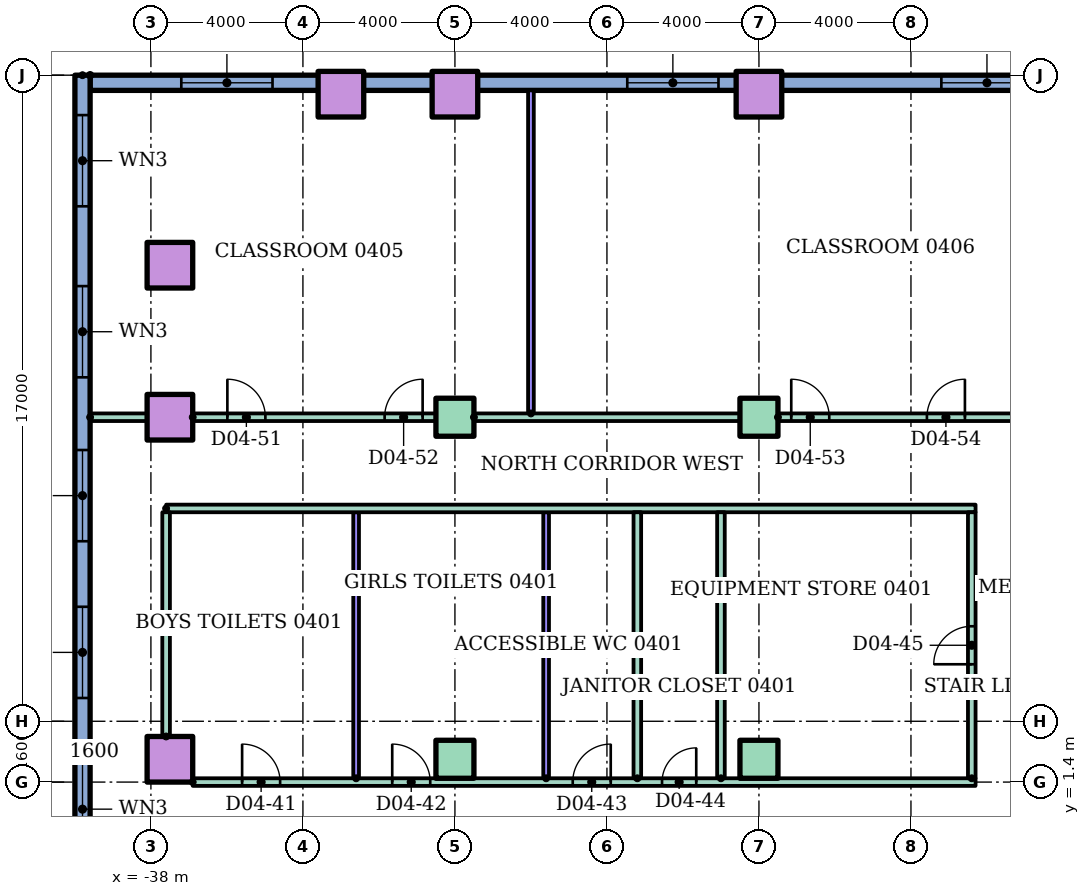
"""IFC4 building model, lengths in metres.
Left out: names, types, materials, properties, quantities, classifications, styles, units other than length and angle.
Written with IfcOpenShell. Run it as: python <this file> out.ifc"""

import sys

from ifc_helpers import new_model, si_unit, direction, frame, frame_2d, origin, origin_2d, place, context, subcontext, project, spatial, rectangle, hollow_rectangle, extrude, element, fill, save


model = new_model("IFC4")
c1 = context("Model", 3, precision=1e-05, world=origin(), true_north=direction((0.0, 1.0)))
c2 = subcontext(c1, "Body", "Model", "MODEL_VIEW")
j1 = project(units=[si_unit("LENGTHUNIT", "METRE"), si_unit("PLANEANGLEUNIT", "RADIAN")], contexts=[c1])
p1 = place(None, origin())
s1 = spatial("IfcSite", under=j1, at=p1, CompositionType="ELEMENT")
p2 = place(p1, origin())
s2 = spatial("IfcBuilding", under=s1, at=p2, CompositionType="ELEMENT")
p3 = place(p2, frame((0.0, 0.0, 18.0)))
s3 = spatial("IfcBuildingStorey", under=s2, at=p3, CompositionType="ELEMENT", Elevation=18.0)
p4 = place(p3, frame((-37.5, 2.0, 0.0)))
e1 = element("IfcColumn", 1, at=p4, inside=s3, PredefinedType="COLUMN", context=c2, shape_type="SweptSolid", body=[
    extrude(hollow_rectangle(XDim=1.2, YDim=1.2, WallThickness=0.06, at=origin_2d()), origin(), (0.0, 0.0, 1.0), 4.0),
])
for number, where in (
    (2, (-30.0, 2.0, 0.0)),
    (3, (-22.0, 2.0, 0.0)),
):
    element("IfcColumn", number, at=place(p3, frame(where)), inside=s3, PredefinedType="COLUMN", context=c2, shape_type="SweptSolid", body=[
        extrude(rectangle(XDim=1.0, YDim=1.0, at=origin_2d()), origin(), (0.0, 0.0, 1.0), 4.0),
    ])
p5 = place(p3, frame((-37.5, 11.0, 0.0)))
e4 = element("IfcColumn", 4, at=p5, inside=s3, PredefinedType="COLUMN", context=c2, shape_type="SweptSolid", body=[
    extrude(hollow_rectangle(XDim=1.2, YDim=1.2, WallThickness=0.06, at=origin_2d()), origin(), (0.0, 0.0, 1.0), 4.0),
])
for number, where in (
    (5, (-30.0, 11.0, 0.0)),
    (6, (-22.0, 11.0, 0.0)),
):
    element("IfcColumn", number, at=place(p3, frame(where)), inside=s3, PredefinedType="COLUMN", context=c2, shape_type="SweptSolid", body=[
        extrude(rectangle(XDim=1.0, YDim=1.0, at=origin_2d()), origin(), (0.0, 0.0, 1.0), 4.0),
    ])
for number, where in (
    (7, (-37.5, 15.0, 0.0)),
    (8, (-33.0, 19.5, 0.0)),
    (9, (-30.0, 19.5, 0.0)),
    (10, (-22.0, 19.5, 0.0)),
):
    element("IfcColumn", number, at=place(p3, frame(where)), inside=s3, PredefinedType="COLUMN", context=c2, shape_type="SweptSolid", body=[
        extrude(hollow_rectangle(XDim=1.2, YDim=1.2, WallThickness=0.06, at=origin_2d()), origin(), (0.0, 0.0, 1.0), 4.0),
    ])
p6 = place(p3, frame((-14.0, 19.8, 0.0), z_axis=(0.0, 0.0, 1.0), x_axis=(-1.0, 0.0, 0.0)))
e11 = element("IfcWall", 11, at=p6, inside=s3, PredefinedType="STANDARD", context=c2, shape_type="SweptSolid", body=[
    extrude(rectangle(XDim=25.6, YDim=0.4, at=frame_2d((12.8, 0.0))), origin(), (0.0, 0.0, 1.0), 3.7),
])
p7 = place(p6, frame((0.8, 0.0, 0.9)))
e12 = element("IfcOpeningElement", 12, at=p7, cuts=e11, PredefinedType="OPENING", context=c2, shape_type="SweptSolid", body=[
    extrude(rectangle(XDim=2.4, YDim=2.1, at=frame_2d((1.2, 1.05))), frame((0.0, 0.21, 0.0), z_axis=(0.0, -1.0, 0.0), x_axis=(1.0, 0.0, 0.0)), (0.0, 0.0, 1.0), 0.42),
])
p8 = place(p6, frame((9.065, 0.0, 0.9)))
e13 = element("IfcOpeningElement", 13, at=p8, cuts=e11, PredefinedType="OPENING", context=c2, shape_type="SweptSolid", body=[
    extrude(rectangle(XDim=2.4, YDim=2.1, at=frame_2d((1.2, 1.05))), frame((0.0, 0.21, 0.0), z_axis=(0.0, -1.0, 0.0), x_axis=(1.0, 0.0, 0.0)), (0.0, 0.0, 1.0), 0.42),
])
p9 = place(p6, frame((20.8, 0.0, 0.9)))
e14 = element("IfcOpeningElement", 14, at=p9, cuts=e11, PredefinedType="OPENING", context=c2, shape_type="SweptSolid", body=[
    extrude(rectangle(XDim=2.4, YDim=2.1, at=frame_2d((1.2, 1.05))), frame((0.0, 0.21, 0.0), z_axis=(0.0, -1.0, 0.0), x_axis=(1.0, 0.0, 0.0)), (0.0, 0.0, 1.0), 0.42),
])
p10 = place(p3, frame((-39.8, 20.0, 0.0), z_axis=(0.0, 0.0, 1.0), x_axis=(0.0, -1.0, 0.0)))
e15 = element("IfcWall", 15, at=p10, inside=s3, PredefinedType="STANDARD", context=c2, shape_type="SweptSolid", body=[
    extrude(rectangle(XDim=70.0, YDim=0.4, at=frame_2d((35.0, 0.0))), origin(), (0.0, 0.0, 1.0), 3.7),
])
p11 = place(p10, frame((1.05, 0.0, 0.9)))
e16 = element("IfcOpeningElement", 16, at=p11, cuts=e15, PredefinedType="OPENING", context=c2, shape_type="SweptSolid", body=[
    extrude(rectangle(XDim=2.4, YDim=2.1, at=frame_2d((1.2, 1.05))), frame((0.0, 0.21, 0.0), z_axis=(0.0, -1.0, 0.0), x_axis=(1.0, 0.0, 0.0)), (0.0, 0.0, 1.0), 0.42),
])
p12 = place(p10, frame((5.55, 0.0, 0.9)))
e17 = element("IfcOpeningElement", 17, at=p12, cuts=e15, PredefinedType="OPENING", context=c2, shape_type="SweptSolid", body=[
    extrude(rectangle(XDim=2.4, YDim=2.1, at=frame_2d((1.2, 1.05))), frame((0.0, 0.21, 0.0), z_axis=(0.0, -1.0, 0.0), x_axis=(1.0, 0.0, 0.0)), (0.0, 0.0, 1.0), 0.42),
])
p13 = place(p10, frame((9.863, 0.0, 0.9)))
e18 = element("IfcOpeningElement", 18, at=p13, cuts=e15, PredefinedType="OPENING", context=c2, shape_type="SweptSolid", body=[
    extrude(rectangle(XDim=2.4, YDim=2.1, at=frame_2d((1.2, 1.05))), frame((0.0, 0.21, 0.0), z_axis=(0.0, -1.0, 0.0), x_axis=(1.0, 0.0, 0.0)), (0.0, 0.0, 1.0), 0.42),
])
p14 = place(p10, frame((13.988, 0.0, 0.9)))
e19 = element("IfcOpeningElement", 19, at=p14, cuts=e15, PredefinedType="OPENING", context=c2, shape_type="SweptSolid", body=[
    extrude(rectangle(XDim=2.4, YDim=2.1, at=frame_2d((1.2, 1.05))), frame((0.0, 0.21, 0.0), z_axis=(0.0, -1.0, 0.0), x_axis=(1.0, 0.0, 0.0)), (0.0, 0.0, 1.0), 0.42),
])
p15 = place(p10, frame((18.113, 0.0, 0.9)))
e20 = element("IfcOpeningElement", 20, at=p15, cuts=e15, PredefinedType="OPENING", context=c2, shape_type="SweptSolid", body=[
    extrude(rectangle(XDim=2.4, YDim=2.1, at=frame_2d((1.2, 1.05))), frame((0.0, 0.21, 0.0), z_axis=(0.0, -1.0, 0.0), x_axis=(1.0, 0.0, 0.0)), (0.0, 0.0, 1.0), 0.42),
])
p16 = place(p10, frame((22.238, 0.0, 0.9)))
e21 = element("IfcOpeningElement", 21, at=p16, cuts=e15, PredefinedType="OPENING", context=c2, shape_type="SweptSolid", body=[
    extrude(rectangle(XDim=2.4, YDim=2.1, at=frame_2d((1.2, 1.05))), frame((0.0, 0.21, 0.0), z_axis=(0.0, -1.0, 0.0), x_axis=(1.0, 0.0, 0.0)), (0.0, 0.0, 1.0), 0.42),
])
p17 = place(p10, frame((26.363, 0.0, 0.9)))
e22 = element("IfcOpeningElement", 22, at=p17, cuts=e15, PredefinedType="OPENING", context=c2, shape_type="SweptSolid", body=[
    extrude(rectangle(XDim=2.4, YDim=2.1, at=frame_2d((1.2, 1.05))), frame((0.0, 0.21, 0.0), z_axis=(0.0, -1.0, 0.0), x_axis=(1.0, 0.0, 0.0)), (0.0, 0.0, 1.0), 0.42),
])
p18 = place(p10, frame((30.488, 0.0, 0.9)))
e23 = element("IfcOpeningElement", 23, at=p18, cuts=e15, PredefinedType="OPENING", context=c2, shape_type="SweptSolid", body=[
    extrude(rectangle(XDim=2.4, YDim=2.1, at=frame_2d((1.2, 1.05))), frame((0.0, 0.21, 0.0), z_axis=(0.0, -1.0, 0.0), x_axis=(1.0, 0.0, 0.0)), (0.0, 0.0, 1.0), 0.42),
])
p19 = place(p10, frame((34.613, 0.0, 0.9)))
e24 = element("IfcOpeningElement", 24, at=p19, cuts=e15, PredefinedType="OPENING", context=c2, shape_type="SweptSolid", body=[
    extrude(rectangle(XDim=2.4, YDim=2.1, at=frame_2d((1.2, 1.05))), frame((0.0, 0.21, 0.0), z_axis=(0.0, -1.0, 0.0), x_axis=(1.0, 0.0, 0.0)), (0.0, 0.0, 1.0), 0.42),
])
p20 = place(p10, frame((38.738, 0.0, 0.9)))
e25 = element("IfcOpeningElement", 25, at=p20, cuts=e15, PredefinedType="OPENING", context=c2, shape_type="SweptSolid", body=[
    extrude(rectangle(XDim=2.4, YDim=2.1, at=frame_2d((1.2, 1.05))), frame((0.0, 0.21, 0.0), z_axis=(0.0, -1.0, 0.0), x_axis=(1.0, 0.0, 0.0)), (0.0, 0.0, 1.0), 0.42),
])
p21 = place(p10, frame((54.05, 0.0, 0.9)))
e26 = element("IfcOpeningElement", 26, at=p21, cuts=e15, PredefinedType="OPENING", context=c2, shape_type="SweptSolid", body=[
    extrude(rectangle(XDim=2.4, YDim=2.1, at=frame_2d((1.2, 1.05))), frame((0.0, 0.21, 0.0), z_axis=(0.0, -1.0, 0.0), x_axis=(1.0, 0.0, 0.0)), (0.0, 0.0, 1.0), 0.42),
])
p22 = place(p10, frame((57.55, 0.0, 0.9)))
e27 = element("IfcOpeningElement", 27, at=p22, cuts=e15, PredefinedType="OPENING", context=c2, shape_type="SweptSolid", body=[
    extrude(rectangle(XDim=2.4, YDim=2.1, at=frame_2d((1.2, 1.05))), frame((0.0, 0.21, 0.0), z_axis=(0.0, -1.0, 0.0), x_axis=(1.0, 0.0, 0.0)), (0.0, 0.0, 1.0), 0.42),
])
p23 = place(p10, frame((61.05, 0.0, 0.9)))
e28 = element("IfcOpeningElement", 28, at=p23, cuts=e15, PredefinedType="OPENING", context=c2, shape_type="SweptSolid", body=[
    extrude(rectangle(XDim=2.4, YDim=2.1, at=frame_2d((1.2, 1.05))), frame((0.0, 0.21, 0.0), z_axis=(0.0, -1.0, 0.0), x_axis=(1.0, 0.0, 0.0)), (0.0, 0.0, 1.0), 0.42),
])
p24 = place(p10, frame((66.85, 0.0, 0.9)))
e29 = element("IfcOpeningElement", 29, at=p24, cuts=e15, PredefinedType="OPENING", context=c2, shape_type="SweptSolid", body=[
    extrude(rectangle(XDim=2.4, YDim=2.1, at=frame_2d((1.2, 1.05))), frame((0.0, 0.21, 0.0), z_axis=(0.0, -1.0, 0.0), x_axis=(1.0, 0.0, 0.0)), (0.0, 0.0, 1.0), 0.42),
])
p25 = place(p3, frame((-36.9, 1.4, 0.0)))
e30 = element("IfcWall", 30, at=p25, inside=s3, PredefinedType="PARTITIONING", context=c2, shape_type="SweptSolid", body=[
    extrude(rectangle(XDim=20.6, YDim=0.2, at=frame_2d((10.3, 0.0))), origin(), (0.0, 0.0, 1.0), 3.7),
])
p26 = place(p25, frame((1.3, 0.0, 0.0)))
e31 = element("IfcOpeningElement", 31, at=p26, cuts=e30, PredefinedType="OPENING", context=c2, shape_type="SweptSolid", body=[
    extrude(rectangle(XDim=1.0, YDim=2.1, at=frame_2d((0.5, 1.05))), frame((0.0, 0.11, 0.0), z_axis=(0.0, -1.0, 0.0), x_axis=(1.0, 0.0, 0.0)), (0.0, 0.0, 1.0), 0.22),
])
p27 = place(p25, frame((5.25, 0.0, 0.0)))
e32 = element("IfcOpeningElement", 32, at=p27, cuts=e30, PredefinedType="OPENING", context=c2, shape_type="SweptSolid", body=[
    extrude(rectangle(XDim=1.0, YDim=2.1, at=frame_2d((0.5, 1.05))), frame((0.0, 0.11, 0.0), z_axis=(0.0, -1.0, 0.0), x_axis=(1.0, 0.0, 0.0)), (0.0, 0.0, 1.0), 0.22),
])
p28 = place(p25, frame((10.0, 0.0, 0.0)))
e33 = element("IfcOpeningElement", 33, at=p28, cuts=e30, PredefinedType="OPENING", context=c2, shape_type="SweptSolid", body=[
    extrude(rectangle(XDim=1.0, YDim=2.1, at=frame_2d((0.5, 1.05))), frame((0.0, 0.11, 0.0), z_axis=(0.0, -1.0, 0.0), x_axis=(1.0, 0.0, 0.0)), (0.0, 0.0, 1.0), 0.22),
])
p29 = place(p25, frame((12.35, 0.0, 0.0)))
e34 = element("IfcOpeningElement", 34, at=p29, cuts=e30, PredefinedType="OPENING", context=c2, shape_type="SweptSolid", body=[
    extrude(rectangle(XDim=0.9, YDim=2.1, at=frame_2d((0.45, 1.05))), frame((0.0, 0.11, 0.0), z_axis=(0.0, -1.0, 0.0), x_axis=(1.0, 0.0, 0.0)), (0.0, 0.0, 1.0), 0.22),
])
p30 = place(p3, frame((-37.6, 8.6, 0.0)))
e35 = element("IfcWall", 35, at=p30, inside=s3, PredefinedType="PARTITIONING", context=c2, shape_type="SweptSolid", body=[
    extrude(rectangle(XDim=21.3, YDim=0.2, at=frame_2d((10.65, 0.0))), origin(), (0.0, 0.0, 1.0), 3.7),
])
p31 = place(p3, frame((-39.6, 11.0, 0.0)))
e36 = element("IfcWall", 36, at=p31, inside=s3, PredefinedType="PARTITIONING", context=c2, shape_type="SweptSolid", body=[
    extrude(rectangle(XDim=1.5, YDim=0.2, at=frame_2d((0.75, 0.0))), origin(), (0.0, 0.0, 1.0), 3.7),
])
p32 = place(p3, frame((-36.9, 11.0, 0.0)))
e37 = element("IfcWall", 37, at=p32, inside=s3, PredefinedType="PARTITIONING", context=c2, shape_type="SweptSolid", body=[
    extrude(rectangle(XDim=6.4, YDim=0.2, at=frame_2d((3.2, 0.0))), origin(), (0.0, 0.0, 1.0), 3.7),
])
p33 = place(p32, frame((0.912, 0.0, 0.0)))
e38 = element("IfcOpeningElement", 38, at=p33, cuts=e37, PredefinedType="OPENING", context=c2, shape_type="SweptSolid", body=[
    extrude(rectangle(XDim=1.0, YDim=2.1, at=frame_2d((0.5, 1.05))), frame((0.0, 0.11, 0.0), z_axis=(0.0, -1.0, 0.0), x_axis=(1.0, 0.0, 0.0)), (0.0, 0.0, 1.0), 0.22),
])
p34 = place(p32, frame((5.05, 0.0, 0.0)))
e39 = element("IfcOpeningElement", 39, at=p34, cuts=e37, PredefinedType="OPENING", context=c2, shape_type="SweptSolid", body=[
    extrude(rectangle(XDim=1.0, YDim=2.1, at=frame_2d((0.5, 1.05))), frame((0.0, 0.11, 0.0), z_axis=(0.0, -1.0, 0.0), x_axis=(1.0, 0.0, 0.0)), (0.0, 0.0, 1.0), 0.22),
])
p35 = place(p3, frame((-29.5, 11.0, 0.0)))
e40 = element("IfcWall", 40, at=p35, inside=s3, PredefinedType="PARTITIONING", context=c2, shape_type="SweptSolid", body=[
    extrude(rectangle(XDim=7.0, YDim=0.2, at=frame_2d((3.5, 0.0))), origin(), (0.0, 0.0, 1.0), 3.7),
])
p36 = place(p3, frame((-21.5, 11.0, 0.0)))
e41 = element("IfcWall", 41, at=p36, inside=s3, PredefinedType="PARTITIONING", context=c2, shape_type="SweptSolid", body=[
    extrude(rectangle(XDim=7.5, YDim=0.2, at=frame_2d((3.75, 0.0))), origin(), (0.0, 0.0, 1.0), 3.7),
])
p37 = place(p36, frame((0.35, 0.0, 0.0)))
e42 = element("IfcOpeningElement", 42, at=p37, cuts=e41, PredefinedType="OPENING", context=c2, shape_type="SweptSolid", body=[
    extrude(rectangle(XDim=1.0, YDim=2.1, at=frame_2d((0.5, 1.05))), frame((0.0, 0.11, 0.0), z_axis=(0.0, -1.0, 0.0), x_axis=(1.0, 0.0, 0.0)), (0.0, 0.0, 1.0), 0.22),
])
p38 = place(p36, frame((3.92, 0.0, 0.0)))
e43 = element("IfcOpeningElement", 43, at=p38, cuts=e41, PredefinedType="OPENING", context=c2, shape_type="SweptSolid", body=[
    extrude(rectangle(XDim=1.0, YDim=2.1, at=frame_2d((0.5, 1.05))), frame((0.0, 0.11, 0.0), z_axis=(0.0, -1.0, 0.0), x_axis=(1.0, 0.0, 0.0)), (0.0, 0.0, 1.0), 0.22),
])
p39 = place(p3, frame((-37.6, 2.6, 0.0), z_axis=(0.0, 0.0, 1.0), x_axis=(0.0, 1.0, 0.0)))
e44 = element("IfcWall", 44, at=p39, inside=s3, PredefinedType="PARTITIONING", context=c2, shape_type="SweptSolid", body=[
    extrude(rectangle(XDim=5.9, YDim=0.2, at=frame_2d((2.95, 0.0))), origin(), (0.0, 0.0, 1.0), 3.7),
])
p40 = place(p3, frame((-32.6, 1.5, 0.0), z_axis=(0.0, 0.0, 1.0), x_axis=(0.0, 1.0, 0.0)))
e45 = element("IfcWall", 45, at=p40, inside=s3, PredefinedType="PARTITIONING", context=c2, shape_type="SweptSolid", body=[
    extrude(rectangle(XDim=7.0, YDim=0.15, at=frame_2d((3.5, 0.0))), origin(), (0.0, 0.0, 1.0), 3.7),
])
p41 = place(p3, frame((-28.0, 11.1, 0.0), z_axis=(0.0, 0.0, 1.0), x_axis=(0.0, 1.0, 0.0)))
e46 = element("IfcWall", 46, at=p41, inside=s3, PredefinedType="PARTITIONING", context=c2, shape_type="SweptSolid", body=[
    extrude(rectangle(XDim=8.5, YDim=0.15, at=frame_2d((4.25, 0.0))), origin(), (0.0, 0.0, 1.0), 3.7),
])
p42 = place(p3, frame((-27.6, 1.5, 0.0), z_axis=(0.0, 0.0, 1.0), x_axis=(0.0, 1.0, 0.0)))
e47 = element("IfcWall", 47, at=p42, inside=s3, PredefinedType="PARTITIONING", context=c2, shape_type="SweptSolid", body=[
    extrude(rectangle(XDim=7.0, YDim=0.15, at=frame_2d((3.5, 0.0))), origin(), (0.0, 0.0, 1.0), 3.7),
])
for number, where, z_axis, x_axis in (
    (48, (-25.2, 1.5, 0.0), (0.0, 0.0, 1.0), (0.0, 1.0, 0.0)),
    (49, (-23.0, 1.5, 0.0), (0.0, 0.0, 1.0), (0.0, 1.0, 0.0)),
):
    element("IfcWall", number, at=place(p3, frame(where, z_axis=z_axis, x_axis=x_axis)), inside=s3, PredefinedType="PARTITIONING", context=c2, shape_type="SweptSolid", body=[
        extrude(rectangle(XDim=7.0, YDim=0.2, at=frame_2d((3.5, 0.0))), origin(), (0.0, 0.0, 1.0), 3.7),
    ])
p43 = place(p3, frame((-16.4, 1.5, 0.0), z_axis=(0.0, 0.0, 1.0), x_axis=(0.0, 1.0, 0.0)))
e50 = element("IfcWall", 50, at=p43, inside=s3, PredefinedType="PARTITIONING", context=c2, shape_type="SweptSolid", body=[
    extrude(rectangle(XDim=7.0, YDim=0.2, at=frame_2d((3.5, 0.0))), origin(), (0.0, 0.0, 1.0), 3.7),
])
p44 = place(p43, frame((3.0, 0.0, 0.0)))
e51 = element("IfcOpeningElement", 51, at=p44, cuts=e50, PredefinedType="OPENING", context=c2, shape_type="SweptSolid", body=[
    extrude(rectangle(XDim=1.0, YDim=2.1, at=frame_2d((0.5, 1.05))), frame((0.0, 0.11, 0.0), z_axis=(0.0, -1.0, 0.0), x_axis=(1.0, 0.0, 0.0)), (0.0, 0.0, 1.0), 0.22),
])
p45 = place(p7, origin())
e52 = element("IfcWindow", 52, at=p45, inside=s3, PartitioningType="SINGLE_PANEL", PredefinedType="WINDOW", context=c2, shape_type="SweptSolid", body=[
    extrude(rectangle(XDim=2.4, YDim=2.1, at=frame_2d((1.2, 1.05))), frame((0.0, 0.03, 0.0), z_axis=(0.0, -1.0, 0.0), x_axis=(1.0, 0.0, 0.0)), (0.0, 0.0, 1.0), 0.06),
])
fill(e12, e52)
p46 = place(p8, origin())
e53 = element("IfcWindow", 53, at=p46, inside=s3, PartitioningType="SINGLE_PANEL", PredefinedType="WINDOW", context=c2, shape_type="SweptSolid", body=[
    extrude(rectangle(XDim=2.4, YDim=2.1, at=frame_2d((1.2, 1.05))), frame((0.0, 0.03, 0.0), z_axis=(0.0, -1.0, 0.0), x_axis=(1.0, 0.0, 0.0)), (0.0, 0.0, 1.0), 0.06),
])
fill(e13, e53)
p47 = place(p9, origin())
e54 = element("IfcWindow", 54, at=p47, inside=s3, PartitioningType="SINGLE_PANEL", PredefinedType="WINDOW", context=c2, shape_type="SweptSolid", body=[
    extrude(rectangle(XDim=2.4, YDim=2.1, at=frame_2d((1.2, 1.05))), frame((0.0, 0.03, 0.0), z_axis=(0.0, -1.0, 0.0), x_axis=(1.0, 0.0, 0.0)), (0.0, 0.0, 1.0), 0.06),
])
fill(e14, e54)
p48 = place(p11, origin())
e55 = element("IfcWindow", 55, at=p48, inside=s3, PartitioningType="SINGLE_PANEL", PredefinedType="WINDOW", context=c2, shape_type="SweptSolid", body=[
    extrude(rectangle(XDim=2.4, YDim=2.1, at=frame_2d((1.2, 1.05))), frame((0.0, 0.03, 0.0), z_axis=(0.0, -1.0, 0.0), x_axis=(1.0, 0.0, 0.0)), (0.0, 0.0, 1.0), 0.06),
])
fill(e16, e55)
p49 = place(p12, origin())
e56 = element("IfcWindow", 56, at=p49, inside=s3, PartitioningType="SINGLE_PANEL", PredefinedType="WINDOW", context=c2, shape_type="SweptSolid", body=[
    extrude(rectangle(XDim=2.4, YDim=2.1, at=frame_2d((1.2, 1.05))), frame((0.0, 0.03, 0.0), z_axis=(0.0, -1.0, 0.0), x_axis=(1.0, 0.0, 0.0)), (0.0, 0.0, 1.0), 0.06),
])
fill(e17, e56)
p50 = place(p13, origin())
e57 = element("IfcWindow", 57, at=p50, inside=s3, PartitioningType="SINGLE_PANEL", PredefinedType="WINDOW", context=c2, shape_type="SweptSolid", body=[
    extrude(rectangle(XDim=2.4, YDim=2.1, at=frame_2d((1.2, 1.05))), frame((0.0, 0.03, 0.0), z_axis=(0.0, -1.0, 0.0), x_axis=(1.0, 0.0, 0.0)), (0.0, 0.0, 1.0), 0.06),
])
fill(e18, e57)
p51 = place(p14, origin())
e58 = element("IfcWindow", 58, at=p51, inside=s3, PartitioningType="SINGLE_PANEL", PredefinedType="WINDOW", context=c2, shape_type="SweptSolid", body=[
    extrude(rectangle(XDim=2.4, YDim=2.1, at=frame_2d((1.2, 1.05))), frame((0.0, 0.03, 0.0), z_axis=(0.0, -1.0, 0.0), x_axis=(1.0, 0.0, 0.0)), (0.0, 0.0, 1.0), 0.06),
])
fill(e19, e58)
p52 = place(p15, origin())
e59 = element("IfcWindow", 59, at=p52, inside=s3, PartitioningType="SINGLE_PANEL", PredefinedType="WINDOW", context=c2, shape_type="SweptSolid", body=[
    extrude(rectangle(XDim=2.4, YDim=2.1, at=frame_2d((1.2, 1.05))), frame((0.0, 0.03, 0.0), z_axis=(0.0, -1.0, 0.0), x_axis=(1.0, 0.0, 0.0)), (0.0, 0.0, 1.0), 0.06),
])
fill(e20, e59)
p53 = place(p26, origin())
e60 = element("IfcDoor", 60, at=p53, inside=s3, OperationType="SINGLE_SWING_LEFT", PredefinedType="DOOR", context=c2, shape_type="SweptSolid", body=[
    extrude(rectangle(XDim=1.0, YDim=2.1, at=frame_2d((0.5, 1.05))), frame((0.0, 0.025, 0.0), z_axis=(0.0, -1.0, 0.0), x_axis=(1.0, 0.0, 0.0)), (0.0, 0.0, 1.0), 0.05),
])
fill(e31, e60)
p54 = place(p27, origin())
e61 = element("IfcDoor", 61, at=p54, inside=s3, OperationType="SINGLE_SWING_LEFT", PredefinedType="DOOR", context=c2, shape_type="SweptSolid", body=[
    extrude(rectangle(XDim=1.0, YDim=2.1, at=frame_2d((0.5, 1.05))), frame((0.0, 0.025, 0.0), z_axis=(0.0, -1.0, 0.0), x_axis=(1.0, 0.0, 0.0)), (0.0, 0.0, 1.0), 0.05),
])
fill(e32, e61)
p55 = place(p28, origin())
e62 = element("IfcDoor", 62, at=p55, inside=s3, OperationType="SINGLE_SWING_RIGHT", PredefinedType="DOOR", context=c2, shape_type="SweptSolid", body=[
    extrude(rectangle(XDim=1.0, YDim=2.1, at=frame_2d((0.5, 1.05))), frame((0.0, 0.025, 0.0), z_axis=(0.0, -1.0, 0.0), x_axis=(1.0, 0.0, 0.0)), (0.0, 0.0, 1.0), 0.05),
])
fill(e33, e62)
p56 = place(p29, origin())
e63 = element("IfcDoor", 63, at=p56, inside=s3, OperationType="SINGLE_SWING_RIGHT", PredefinedType="DOOR", context=c2, shape_type="SweptSolid", body=[
    extrude(rectangle(XDim=0.9, YDim=2.1, at=frame_2d((0.45, 1.05))), frame((0.0, 0.025, 0.0), z_axis=(0.0, -1.0, 0.0), x_axis=(1.0, 0.0, 0.0)), (0.0, 0.0, 1.0), 0.05),
])
fill(e34, e63)
p57 = place(p44, origin())
e64 = element("IfcDoor", 64, at=p57, inside=s3, OperationType="SINGLE_SWING_LEFT", PredefinedType="DOOR", context=c2, shape_type="SweptSolid", body=[
    extrude(rectangle(XDim=1.0, YDim=2.1, at=frame_2d((0.5, 1.05))), frame((0.0, 0.025, 0.0), z_axis=(0.0, -1.0, 0.0), x_axis=(1.0, 0.0, 0.0)), (0.0, 0.0, 1.0), 0.05),
])
fill(e51, e64)
p58 = place(p33, origin())
e65 = element("IfcDoor", 65, at=p58, inside=s3, OperationType="SINGLE_SWING_LEFT", PredefinedType="DOOR", context=c2, shape_type="SweptSolid", body=[
    extrude(rectangle(XDim=1.0, YDim=2.1, at=frame_2d((0.5, 1.05))), frame((0.0, 0.025, 0.0), z_axis=(0.0, -1.0, 0.0), x_axis=(1.0, 0.0, 0.0)), (0.0, 0.0, 1.0), 0.05),
])
fill(e38, e65)
p59 = place(p34, origin())
e66 = element("IfcDoor", 66, at=p59, inside=s3, OperationType="SINGLE_SWING_RIGHT", PredefinedType="DOOR", context=c2, shape_type="SweptSolid", body=[
    extrude(rectangle(XDim=1.0, YDim=2.1, at=frame_2d((0.5, 1.05))), frame((0.0, 0.025, 0.0), z_axis=(0.0, -1.0, 0.0), x_axis=(1.0, 0.0, 0.0)), (0.0, 0.0, 1.0), 0.05),
])
fill(e39, e66)
p60 = place(p37, origin())
e67 = element("IfcDoor", 67, at=p60, inside=s3, OperationType="SINGLE_SWING_LEFT", PredefinedType="DOOR", context=c2, shape_type="SweptSolid", body=[
    extrude(rectangle(XDim=1.0, YDim=2.1, at=frame_2d((0.5, 1.05))), frame((0.0, 0.025, 0.0), z_axis=(0.0, -1.0, 0.0), x_axis=(1.0, 0.0, 0.0)), (0.0, 0.0, 1.0), 0.05),
])
fill(e42, e67)
p61 = place(p38, origin())
e68 = element("IfcDoor", 68, at=p61, inside=s3, OperationType="SINGLE_SWING_RIGHT", PredefinedType="DOOR", context=c2, shape_type="SweptSolid", body=[
    extrude(rectangle(XDim=1.0, YDim=2.1, at=frame_2d((0.5, 1.05))), frame((0.0, 0.025, 0.0), z_axis=(0.0, -1.0, 0.0), x_axis=(1.0, 0.0, 0.0)), (0.0, 0.0, 1.0), 0.05),
])
fill(e43, e68)
save(model, sys.argv[1])
